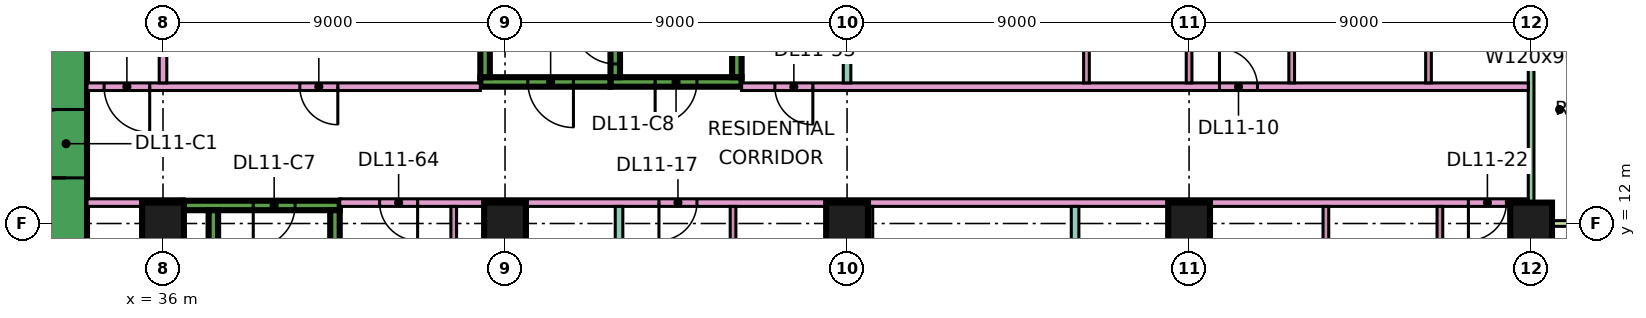
"""IFC4 building model, lengths in metres.
Left out: names, types, materials, properties, quantities, classifications, styles, units other than length and angle.
Written with IfcOpenShell. Run it as: python <this file> out.ifc"""

import sys

from ifc_helpers import new_model, si_unit, direction, frame, frame_2d, origin, origin_2d, place, context, subcontext, project, spatial, rectangle, extrude, element, fill, save


model = new_model("IFC4")
c1 = context("Model", 3, precision=1e-05, world=origin(), true_north=direction((0.0, 1.0)))
c2 = subcontext(c1, "Body", "Model", "MODEL_VIEW")
j1 = project(units=[si_unit("LENGTHUNIT", "METRE"), si_unit("PLANEANGLEUNIT", "RADIAN")], contexts=[c1])
p1 = place(None, origin())
s1 = spatial("IfcSite", under=j1, at=p1, CompositionType="ELEMENT")
p2 = place(p1, origin())
s2 = spatial("IfcBuilding", under=s1, at=p2, CompositionType="ELEMENT")
p3 = place(p2, frame((0.0, 0.0, 56.4)))
s3 = spatial("IfcBuildingStorey", under=s2, at=p3, CompositionType="ELEMENT", Elevation=56.4)
for number, where, z_axis, x_axis in (
    (1, (36.0, 12.0, 0.0), (0.0, 0.0, 1.0), (1.0, 0.0, 0.0)),
    (2, (45.0, 12.0, 0.0), (0.0, 0.0, 1.0), (1.0, 0.0, 0.0)),
    (3, (54.0, 12.0, 0.0), (0.0, 0.0, 1.0), (1.0, 0.0, 0.0)),
    (4, (63.0, 12.0, 0.0), (0.0, 0.0, 1.0), (1.0, 0.0, 0.0)),
    (5, (72.0, 12.0, 0.0), (0.0, 0.0, 1.0), (1.0, 0.0, 0.0)),
):
    element("IfcColumn", number, at=place(p3, frame(where, z_axis=z_axis, x_axis=x_axis)), inside=s3, PredefinedType="COLUMN", context=c2, shape_type="SweptSolid", body=[
        extrude(rectangle(XDim=1.1, YDim=1.1, at=origin_2d()), origin(), (0.0, 0.0, 1.0), 3.75),
    ])
p4 = place(p3, frame((33.45, 8.1, 0.0), z_axis=(0.0, 0.0, 1.0), x_axis=(0.0, 1.0, 0.0)))
e6 = element("IfcWall", 6, at=p4, inside=s3, PredefinedType="SHEAR", context=c2, shape_type="SweptSolid", body=[
    extrude(rectangle(XDim=10.8, YDim=1.1, at=frame_2d((5.4, 0.0))), origin(), (0.0, 0.0, 1.0), 3.75),
])
p5 = place(p4, frame((5.1, 0.0, 0.0)))
e7 = element("IfcOpeningElement", 7, at=p5, cuts=e6, PredefinedType="OPENING", context=c2, shape_type="SweptSolid", body=[
    extrude(rectangle(XDim=1.8, YDim=2.4, at=frame_2d((0.9, 1.2))), frame((0.0, 0.56, 0.0), z_axis=(0.0, -1.0, 0.0), x_axis=(1.0, 0.0, 0.0)), (0.0, 0.0, 1.0), 1.12),
])
p6 = place(p3, frame((36.55, 12.475, 0.0), z_axis=(0.0, 0.0, 1.0), x_axis=(1.0, 0.0, 0.0)))
e8 = element("IfcWall", 8, at=p6, inside=s3, PredefinedType="SHEAR", context=c2, shape_type="SweptSolid", body=[
    extrude(rectangle(XDim=4.1, YDim=0.25, at=frame_2d((2.05, 0.0))), origin(), (0.0, 0.0, 1.0), 3.75),
])
p7 = place(p6, frame((1.825, 0.0, 0.0)))
e9 = element("IfcOpeningElement", 9, at=p7, cuts=e8, PredefinedType="OPENING", context=c2, shape_type="SweptSolid", body=[
    extrude(rectangle(XDim=1.1, YDim=2.2, at=frame_2d((0.55, 1.1))), frame((0.0, 0.135, 0.0), z_axis=(0.0, -1.0, 0.0), x_axis=(1.0, 0.0, 0.0)), (0.0, 0.0, 1.0), 0.27),
])
for number, where, z_axis, x_axis in (
    (10, (37.325, 5.85, 0.0), (0.0, 0.0, 1.0), (0.0, 1.0, 0.0)),
    (11, (40.525, 5.85, 0.0), (0.0, 0.0, 1.0), (0.0, 1.0, 0.0)),
):
    element("IfcWall", number, at=place(p3, frame(where, z_axis=z_axis, x_axis=x_axis)), inside=s3, PredefinedType="SHEAR", context=c2, shape_type="SweptSolid", body=[
        extrude(rectangle(XDim=6.5, YDim=0.25, at=frame_2d((3.25, 0.0))), origin(), (0.0, 0.0, 1.0), 3.75),
    ])
p8 = place(p3, frame((47.775, 15.725, 0.0), z_axis=(0.0, 0.0, 1.0), x_axis=(1.0, 0.0, 0.0)))
e12 = element("IfcWall", 12, at=p8, inside=s3, PredefinedType="SHEAR", context=c2, shape_type="SweptSolid", body=[
    extrude(rectangle(XDim=3.45, YDim=0.25, at=frame_2d((1.725, 0.0))), origin(), (0.0, 0.0, 1.0), 3.75),
])
p9 = place(p8, frame((1.175, 0.0, 0.0)))
e13 = element("IfcOpeningElement", 13, at=p9, cuts=e12, PredefinedType="OPENING", context=c2, shape_type="SweptSolid", body=[
    extrude(rectangle(XDim=1.1, YDim=2.2, at=frame_2d((0.55, 1.1))), frame((0.0, 0.135, 0.0), z_axis=(0.0, -1.0, 0.0), x_axis=(1.0, 0.0, 0.0)), (0.0, 0.0, 1.0), 0.27),
])
p10 = place(p3, frame((47.9, 15.85, 0.0), z_axis=(0.0, 0.0, 1.0), x_axis=(0.0, 1.0, 0.0)))
e14 = element("IfcWall", 14, at=p10, inside=s3, PredefinedType="SHEAR", context=c2, shape_type="SweptSolid", body=[
    extrude(rectangle(XDim=6.5, YDim=0.25, at=frame_2d((3.25, 0.0))), origin(), (0.0, 0.0, 1.0), 3.75),
])
p11 = place(p10, frame((0.35, 0.0, 0.0)))
e15 = element("IfcOpeningElement", 15, at=p11, cuts=e14, PredefinedType="OPENING", context=c2, shape_type="SweptSolid", body=[
    extrude(rectangle(XDim=1.1, YDim=2.2, at=frame_2d((0.55, 1.1))), frame((0.0, 0.135, 0.0), z_axis=(0.0, -1.0, 0.0), x_axis=(1.0, 0.0, 0.0)), (0.0, 0.0, 1.0), 0.27),
])
p12 = place(p3, frame((51.1, 15.85, 0.0), z_axis=(0.0, 0.0, 1.0), x_axis=(0.0, 1.0, 0.0)))
e16 = element("IfcWall", 16, at=p12, inside=s3, PredefinedType="SHEAR", context=c2, shape_type="SweptSolid", body=[
    extrude(rectangle(XDim=6.5, YDim=0.25, at=frame_2d((3.25, 0.0))), origin(), (0.0, 0.0, 1.0), 3.75),
])
p13 = place(p3, frame((44.35, 15.725, 0.0), z_axis=(0.0, 0.0, 1.0), x_axis=(1.0, 0.0, 0.0)))
e17 = element("IfcWall", 17, at=p13, inside=s3, PredefinedType="SHEAR", context=c2, shape_type="SweptSolid", body=[
    extrude(rectangle(XDim=3.425, YDim=0.25, at=frame_2d((1.712, 0.0))), origin(), (0.0, 0.0, 1.0), 3.75),
])
p14 = place(p13, frame((1.25, 0.0, 0.0)))
e18 = element("IfcOpeningElement", 18, at=p14, cuts=e17, PredefinedType="OPENING", context=c2, shape_type="SweptSolid", body=[
    extrude(rectangle(XDim=1.2, YDim=2.2, at=frame_2d((0.6, 1.1))), frame((0.0, 0.135, 0.0), z_axis=(0.0, -1.0, 0.0), x_axis=(1.0, 0.0, 0.0)), (0.0, 0.0, 1.0), 0.27),
])
p15 = place(p3, frame((44.475, 15.85, 0.0), z_axis=(0.0, 0.0, 1.0), x_axis=(0.0, 1.0, 0.0)))
e19 = element("IfcWall", 19, at=p15, inside=s3, PredefinedType="SHEAR", context=c2, shape_type="SweptSolid", body=[
    extrude(rectangle(XDim=6.5, YDim=0.25, at=frame_2d((3.25, 0.0))), origin(), (0.0, 0.0, 1.0), 3.75),
])
p16 = place(p15, frame((1.75, 0.0, 0.0)))
e20 = element("IfcOpeningElement", 20, at=p16, cuts=e19, PredefinedType="OPENING", context=c2, shape_type="SweptSolid", body=[
    extrude(rectangle(XDim=1.1, YDim=2.2, at=frame_2d((0.55, 1.1))), frame((0.0, 0.135, 0.0), z_axis=(0.0, -1.0, 0.0), x_axis=(1.0, 0.0, 0.0)), (0.0, 0.0, 1.0), 0.27),
])
p17 = place(p15, frame((4.3, 0.0, 0.0)))
e21 = element("IfcOpeningElement", 21, at=p17, cuts=e19, PredefinedType="OPENING", context=c2, shape_type="SweptSolid", body=[
    extrude(rectangle(XDim=1.1, YDim=2.2, at=frame_2d((0.55, 1.1))), frame((0.0, 0.135, 0.0), z_axis=(0.0, -1.0, 0.0), x_axis=(1.0, 0.0, 0.0)), (0.0, 0.0, 1.0), 0.27),
])
p18 = place(p3, frame((72.0, 12.075, 0.0), z_axis=(0.0, 0.0, 1.0), x_axis=(0.0, 1.0, 0.0)))
e22 = element("IfcWall", 22, at=p18, inside=s3, PredefinedType="SOLIDWALL", context=c2, shape_type="SweptSolid", body=[
    extrude(rectangle(XDim=10.35, YDim=0.15, at=frame_2d((5.175, 0.0))), origin(), (0.0, 0.0, 1.0), 3.35),
])
p19 = place(p18, frame((4.275, 0.0, 1.7)))
e23 = element("IfcOpeningElement", 23, at=p19, cuts=e22, PredefinedType="OPENING", context=c2, shape_type="SweptSolid", body=[
    extrude(rectangle(XDim=1.2, YDim=0.9, at=frame_2d((0.6, 0.45))), frame((0.0, 0.085, 0.0), z_axis=(0.0, -1.0, 0.0), x_axis=(1.0, 0.0, 0.0)), (0.0, 0.0, 1.0), 0.17),
])
p20 = place(p18, frame((7.988, 0.0, 0.45)))
e24 = element("IfcOpeningElement", 24, at=p20, cuts=e22, PredefinedType="OPENING", context=c2, shape_type="SweptSolid", body=[
    extrude(rectangle(XDim=1.8, YDim=2.4, at=frame_2d((0.9, 1.2))), frame((0.0, 0.085, 0.0), z_axis=(0.0, -1.0, 0.0), x_axis=(1.0, 0.0, 0.0)), (0.0, 0.0, 1.0), 0.17),
])
p21 = place(p3, frame((73.5, 12.0, 0.0), z_axis=(0.0, 0.0, 1.0), x_axis=(-1.0, 0.0, 0.0)))
e25 = element("IfcWall", 25, at=p21, inside=s3, PredefinedType="SOLIDWALL", context=c2, shape_type="SweptSolid", body=[
    extrude(rectangle(XDim=1.5, YDim=0.15, at=frame_2d((0.75, 0.0))), origin(), (0.0, 0.0, 1.0), 3.35),
])
p22 = place(p3, frame((34.0, 12.55, 0.0), z_axis=(0.0, 0.0, 1.0), x_axis=(1.0, 0.0, 0.0)))
e26 = element("IfcWall", 26, at=p22, inside=s3, PredefinedType="PARTITIONING", context=c2, shape_type="SweptSolid", body=[
    extrude(rectangle(XDim=2.551, YDim=0.2, at=frame_2d((1.275, 0.0))), origin(), (0.0, 0.0, 1.0), 3.35),
])
p23 = place(p3, frame((34.0, 15.6, 0.0), z_axis=(0.0, 0.0, 1.0), x_axis=(1.0, 0.0, 0.0)))
e27 = element("IfcWall", 27, at=p23, inside=s3, PredefinedType="PARTITIONING", context=c2, shape_type="SweptSolid", body=[
    extrude(rectangle(XDim=10.35, YDim=0.2, at=frame_2d((5.175, 0.0))), origin(), (0.0, 0.0, 1.0), 3.35),
])
p24 = place(p23, frame((5.6, 0.0, 0.0)))
e28 = element("IfcOpeningElement", 28, at=p24, cuts=e27, PredefinedType="OPENING", context=c2, shape_type="SweptSolid", body=[
    extrude(rectangle(XDim=1.0, YDim=2.1, at=frame_2d((0.5, 1.05))), frame((0.0, 0.11, 0.0), z_axis=(0.0, -1.0, 0.0), x_axis=(1.0, 0.0, 0.0)), (0.0, 0.0, 1.0), 0.22),
])
p25 = place(p23, frame((0.45, 0.0, 0.0)))
e29 = element("IfcOpeningElement", 29, at=p25, cuts=e27, PredefinedType="OPENING", context=c2, shape_type="SweptSolid", body=[
    extrude(rectangle(XDim=1.2, YDim=2.1, at=frame_2d((0.6, 1.05))), frame((0.0, 0.11, 0.0), z_axis=(0.0, -1.0, 0.0), x_axis=(1.0, 0.0, 0.0)), (0.0, 0.0, 1.0), 0.22),
])
p26 = place(p3, frame((36.0, 15.7, 0.0), z_axis=(0.0, 0.0, 1.0), x_axis=(0.0, 1.0, 0.0)))
e30 = element("IfcWall", 30, at=p26, inside=s3, PredefinedType="PARTITIONING", context=c2, shape_type="SweptSolid", body=[
    extrude(rectangle(XDim=8.3, YDim=0.2, at=frame_2d((4.15, 0.0))), origin(), (0.0, 0.0, 1.0), 3.35),
])
p27 = place(p3, frame((40.65, 12.55, 0.0), z_axis=(0.0, 0.0, 1.0), x_axis=(1.0, 0.0, 0.0)))
e31 = element("IfcWall", 31, at=p27, inside=s3, PredefinedType="PARTITIONING", context=c2, shape_type="SweptSolid", body=[
    extrude(rectangle(XDim=31.276, YDim=0.2, at=frame_2d((15.638, 0.0))), origin(), (0.0, 0.0, 1.0), 3.35),
])
p28 = place(p27, frame((8.4, 0.0, 0.0)))
e32 = element("IfcOpeningElement", 32, at=p28, cuts=e31, PredefinedType="OPENING", context=c2, shape_type="SweptSolid", body=[
    extrude(rectangle(XDim=1.0, YDim=2.1, at=frame_2d((0.5, 1.05))), frame((0.0, 0.11, 0.0), z_axis=(0.0, -1.0, 0.0), x_axis=(1.0, 0.0, 0.0)), (0.0, 0.0, 1.0), 0.22),
])
p29 = place(p27, frame((29.7, 0.0, 0.0)))
e33 = element("IfcOpeningElement", 33, at=p29, cuts=e31, PredefinedType="OPENING", context=c2, shape_type="SweptSolid", body=[
    extrude(rectangle(XDim=1.0, YDim=2.1, at=frame_2d((0.5, 1.05))), frame((0.0, 0.11, 0.0), z_axis=(0.0, -1.0, 0.0), x_axis=(1.0, 0.0, 0.0)), (0.0, 0.0, 1.0), 0.22),
])
p30 = place(p27, frame((1.05, 0.0, 0.0)))
e34 = element("IfcOpeningElement", 34, at=p30, cuts=e31, PredefinedType="OPENING", context=c2, shape_type="SweptSolid", body=[
    extrude(rectangle(XDim=1.0, YDim=2.1, at=frame_2d((0.5, 1.05))), frame((0.0, 0.11, 0.0), z_axis=(0.0, -1.0, 0.0), x_axis=(1.0, 0.0, 0.0)), (0.0, 0.0, 1.0), 0.22),
])
p31 = place(p3, frame((43.65, 5.825, 0.0), z_axis=(0.0, 0.0, 1.0), x_axis=(0.0, 1.0, 0.0)))
e35 = element("IfcWall", 35, at=p31, inside=s3, PredefinedType="PARTITIONING", context=c2, shape_type="SweptSolid", body=[
    extrude(rectangle(XDim=6.625, YDim=0.15, at=frame_2d((3.312, 0.0))), origin(), (0.0, 0.0, 1.0), 3.35),
])
p32 = place(p31, frame((4.425, 0.0, 0.0)))
e36 = element("IfcOpeningElement", 36, at=p32, cuts=e35, PredefinedType="OPENING", context=c2, shape_type="SweptSolid", body=[
    extrude(rectangle(XDim=0.9, YDim=2.1, at=frame_2d((0.45, 1.05))), frame((0.0, 0.085, 0.0), z_axis=(0.0, -1.0, 0.0), x_axis=(1.0, 0.0, 0.0)), (0.0, 0.0, 1.0), 0.17),
])
p33 = place(p3, frame((48.0, 5.9, 0.0), z_axis=(0.0, 0.0, 1.0), x_axis=(0.0, 1.0, 0.0)))
e37 = element("IfcWall", 37, at=p33, inside=s3, PredefinedType="PARTITIONING", context=c2, shape_type="SweptSolid", body=[
    extrude(rectangle(XDim=6.55, YDim=0.2, at=frame_2d((3.275, 0.0))), origin(), (0.0, 0.0, 1.0), 3.35),
])
p34 = place(p3, frame((51.0, 7.225, 0.0), z_axis=(0.0, 0.0, 1.0), x_axis=(0.0, 1.0, 0.0)))
e38 = element("IfcWall", 38, at=p34, inside=s3, PredefinedType="PARTITIONING", context=c2, shape_type="SweptSolid", body=[
    extrude(rectangle(XDim=5.225, YDim=0.15, at=frame_2d((2.612, 0.0))), origin(), (0.0, 0.0, 1.0), 3.35),
])
p35 = place(p34, frame((2.175, 0.0, 0.0)))
e39 = element("IfcOpeningElement", 39, at=p35, cuts=e38, PredefinedType="OPENING", context=c2, shape_type="SweptSolid", body=[
    extrude(rectangle(XDim=0.8, YDim=2.1, at=frame_2d((0.4, 1.05))), frame((0.0, 0.085, 0.0), z_axis=(0.0, -1.0, 0.0), x_axis=(1.0, 0.0, 0.0)), (0.0, 0.0, 1.0), 0.17),
])
p36 = place(p3, frame((51.225, 15.6, 0.0), z_axis=(0.0, 0.0, 1.0), x_axis=(1.0, 0.0, 0.0)))
e40 = element("IfcWall", 40, at=p36, inside=s3, PredefinedType="PARTITIONING", context=c2, shape_type="SweptSolid", body=[
    extrude(rectangle(XDim=20.701, YDim=0.2, at=frame_2d((10.351, 0.0))), origin(), (0.0, 0.0, 1.0), 3.35),
])
p37 = place(p36, frame((12.575, 0.0, 0.0)))
e41 = element("IfcOpeningElement", 41, at=p37, cuts=e40, PredefinedType="OPENING", context=c2, shape_type="SweptSolid", body=[
    extrude(rectangle(XDim=1.0, YDim=2.1, at=frame_2d((0.5, 1.05))), frame((0.0, 0.11, 0.0), z_axis=(0.0, -1.0, 0.0), x_axis=(1.0, 0.0, 0.0)), (0.0, 0.0, 1.0), 0.22),
])
p38 = place(p36, frame((0.875, 0.0, 0.0)))
e42 = element("IfcOpeningElement", 42, at=p38, cuts=e40, PredefinedType="OPENING", context=c2, shape_type="SweptSolid", body=[
    extrude(rectangle(XDim=1.0, YDim=2.1, at=frame_2d((0.5, 1.05))), frame((0.0, 0.11, 0.0), z_axis=(0.0, -1.0, 0.0), x_axis=(1.0, 0.0, 0.0)), (0.0, 0.0, 1.0), 0.22),
])
p39 = place(p3, frame((54.0, 15.7, 0.0), z_axis=(0.0, 0.0, 1.0), x_axis=(0.0, 1.0, 0.0)))
e43 = element("IfcWall", 43, at=p39, inside=s3, PredefinedType="PARTITIONING", context=c2, shape_type="SweptSolid", body=[
    extrude(rectangle(XDim=8.3, YDim=0.2, at=frame_2d((4.15, 0.0))), origin(), (0.0, 0.0, 1.0), 3.35),
])
p40 = place(p3, frame((54.6, 7.225, 0.0), z_axis=(0.0, 0.0, 1.0), x_axis=(0.0, 1.0, 0.0)))
e44 = element("IfcWall", 44, at=p40, inside=s3, PredefinedType="PARTITIONING", context=c2, shape_type="SweptSolid", body=[
    extrude(rectangle(XDim=5.225, YDim=0.15, at=frame_2d((2.612, 0.0))), origin(), (0.0, 0.0, 1.0), 3.35),
])
p41 = place(p3, frame((60.0, 0.0, 0.0), z_axis=(0.0, 0.0, 1.0), x_axis=(0.0, 1.0, 0.0)))
e45 = element("IfcWall", 45, at=p41, inside=s3, PredefinedType="PARTITIONING", context=c2, shape_type="SweptSolid", body=[
    extrude(rectangle(XDim=12.45, YDim=0.2, at=frame_2d((6.225, 0.0))), origin(), (0.0, 0.0, 1.0), 3.35),
])
p42 = place(p3, frame((60.3, 15.7, 0.0), z_axis=(0.0, 0.0, 1.0), x_axis=(0.0, 1.0, 0.0)))
e46 = element("IfcWall", 46, at=p42, inside=s3, PredefinedType="PARTITIONING", context=c2, shape_type="SweptSolid", body=[
    extrude(rectangle(XDim=2.525, YDim=0.15, at=frame_2d((1.263, 0.0))), origin(), (0.0, 0.0, 1.0), 3.35),
])
p43 = place(p3, frame((63.0, 15.7, 0.0), z_axis=(0.0, 0.0, 1.0), x_axis=(0.0, 1.0, 0.0)))
e47 = element("IfcWall", 47, at=p43, inside=s3, PredefinedType="PARTITIONING", context=c2, shape_type="SweptSolid", body=[
    extrude(rectangle(XDim=2.525, YDim=0.15, at=frame_2d((1.263, 0.0))), origin(), (0.0, 0.0, 1.0), 3.35),
])
p44 = place(p43, frame((0.9, 0.0, 0.0)))
e48 = element("IfcOpeningElement", 48, at=p44, cuts=e47, PredefinedType="OPENING", context=c2, shape_type="SweptSolid", body=[
    extrude(rectangle(XDim=0.8, YDim=2.1, at=frame_2d((0.4, 1.05))), frame((0.0, 0.085, 0.0), z_axis=(0.0, -1.0, 0.0), x_axis=(1.0, 0.0, 0.0)), (0.0, 0.0, 1.0), 0.17),
])
p45 = place(p3, frame((65.7, 15.7, 0.0), z_axis=(0.0, 0.0, 1.0), x_axis=(0.0, 1.0, 0.0)))
e49 = element("IfcWall", 49, at=p45, inside=s3, PredefinedType="PARTITIONING", context=c2, shape_type="SweptSolid", body=[
    extrude(rectangle(XDim=2.525, YDim=0.15, at=frame_2d((1.263, 0.0))), origin(), (0.0, 0.0, 1.0), 3.35),
])
p46 = place(p3, frame((66.6, 7.825, 0.0), z_axis=(0.0, 0.0, 1.0), x_axis=(0.0, 1.0, 0.0)))
e50 = element("IfcWall", 50, at=p46, inside=s3, PredefinedType="PARTITIONING", context=c2, shape_type="SweptSolid", body=[
    extrude(rectangle(XDim=4.625, YDim=0.15, at=frame_2d((2.312, 0.0))), origin(), (0.0, 0.0, 1.0), 3.35),
])
p47 = place(p3, frame((69.3, 15.7, 0.0), z_axis=(0.0, 0.0, 1.0), x_axis=(0.0, 1.0, 0.0)))
e51 = element("IfcWall", 51, at=p47, inside=s3, PredefinedType="PARTITIONING", context=c2, shape_type="SweptSolid", body=[
    extrude(rectangle(XDim=2.525, YDim=0.15, at=frame_2d((1.263, 0.0))), origin(), (0.0, 0.0, 1.0), 3.35),
])
p48 = place(p3, frame((69.6, 7.825, 0.0), z_axis=(0.0, 0.0, 1.0), x_axis=(0.0, 1.0, 0.0)))
e52 = element("IfcWall", 52, at=p48, inside=s3, PredefinedType="PARTITIONING", context=c2, shape_type="SweptSolid", body=[
    extrude(rectangle(XDim=4.625, YDim=0.15, at=frame_2d((2.312, 0.0))), origin(), (0.0, 0.0, 1.0), 3.35),
])
p49 = place(p19, origin())
e53 = element("IfcWindow", 53, at=p49, inside=s3, PartitioningType="SINGLE_PANEL", PredefinedType="WINDOW", context=c2, shape_type="SweptSolid", body=[
    extrude(rectangle(XDim=1.2, YDim=0.9, at=frame_2d((0.6, 0.45))), frame((0.0, 0.03, 0.0), z_axis=(0.0, -1.0, 0.0), x_axis=(1.0, 0.0, 0.0)), (0.0, 0.0, 1.0), 0.06),
])
fill(e23, e53)
p50 = place(p5, origin())
e54 = element("IfcDoor", 54, at=p50, inside=s3, OperationType="DOUBLE_DOOR_SINGLE_SWING", PredefinedType="DOOR", context=c2, shape_type="SweptSolid", body=[
    extrude(rectangle(XDim=1.8, YDim=2.4, at=frame_2d((0.9, 1.2))), frame((0.0, 0.025, 0.0), z_axis=(0.0, -1.0, 0.0), x_axis=(1.0, 0.0, 0.0)), (0.0, 0.0, 1.0), 0.05),
])
fill(e7, e54)
p51 = place(p7, frame((1.1, 0.0, 0.0), z_axis=(0.0, 0.0, 1.0), x_axis=(-1.0, 0.0, 0.0)))
e55 = element("IfcDoor", 55, at=p51, inside=s3, OperationType="SINGLE_SWING_LEFT", PredefinedType="DOOR", context=c2, shape_type="SweptSolid", body=[
    extrude(rectangle(XDim=1.1, YDim=2.2, at=frame_2d((0.55, 1.1))), frame((0.0, 0.025, 0.0), z_axis=(0.0, -1.0, 0.0), x_axis=(1.0, 0.0, 0.0)), (0.0, 0.0, 1.0), 0.05),
])
fill(e9, e55)
p52 = place(p9, frame((1.1, 0.0, 0.0), z_axis=(0.0, 0.0, 1.0), x_axis=(-1.0, 0.0, 0.0)))
e56 = element("IfcDoor", 56, at=p52, inside=s3, OperationType="SINGLE_SWING_LEFT", PredefinedType="DOOR", context=c2, shape_type="SweptSolid", body=[
    extrude(rectangle(XDim=1.1, YDim=2.2, at=frame_2d((0.55, 1.1))), frame((0.0, 0.025, 0.0), z_axis=(0.0, -1.0, 0.0), x_axis=(1.0, 0.0, 0.0)), (0.0, 0.0, 1.0), 0.05),
])
fill(e13, e56)
p53 = place(p14, origin())
e57 = element("IfcDoor", 57, at=p53, inside=s3, OperationType="SINGLE_SWING_RIGHT", PredefinedType="DOOR", context=c2, shape_type="SweptSolid", body=[
    extrude(rectangle(XDim=1.2, YDim=2.2, at=frame_2d((0.6, 1.1))), frame((0.0, 0.025, 0.0), z_axis=(0.0, -1.0, 0.0), x_axis=(1.0, 0.0, 0.0)), (0.0, 0.0, 1.0), 0.05),
])
fill(e18, e57)
p54 = place(p11, frame((1.1, 0.0, 0.0), z_axis=(0.0, 0.0, 1.0), x_axis=(-1.0, 0.0, 0.0)))
e58 = element("IfcDoor", 58, at=p54, inside=s3, OperationType="SINGLE_SWING_RIGHT", PredefinedType="DOOR", context=c2, shape_type="SweptSolid", body=[
    extrude(rectangle(XDim=1.1, YDim=2.2, at=frame_2d((0.55, 1.1))), frame((0.0, 0.025, 0.0), z_axis=(0.0, -1.0, 0.0), x_axis=(1.0, 0.0, 0.0)), (0.0, 0.0, 1.0), 0.05),
])
fill(e15, e58)
p55 = place(p24, origin())
e59 = element("IfcDoor", 59, at=p55, inside=s3, OperationType="SINGLE_SWING_RIGHT", PredefinedType="DOOR", context=c2, shape_type="SweptSolid", body=[
    extrude(rectangle(XDim=1.0, YDim=2.1, at=frame_2d((0.5, 1.05))), frame((0.0, 0.025, 0.0), z_axis=(0.0, -1.0, 0.0), x_axis=(1.0, 0.0, 0.0)), (0.0, 0.0, 1.0), 0.05),
])
fill(e28, e59)
p56 = place(p37, origin())
e60 = element("IfcDoor", 60, at=p56, inside=s3, OperationType="SINGLE_SWING_LEFT", PredefinedType="DOOR", context=c2, shape_type="SweptSolid", body=[
    extrude(rectangle(XDim=1.0, YDim=2.1, at=frame_2d((0.5, 1.05))), frame((0.0, 0.025, 0.0), z_axis=(0.0, -1.0, 0.0), x_axis=(1.0, 0.0, 0.0)), (0.0, 0.0, 1.0), 0.05),
])
fill(e41, e60)
p57 = place(p28, frame((1.0, 0.0, 0.0), z_axis=(0.0, 0.0, 1.0), x_axis=(-1.0, 0.0, 0.0)))
e61 = element("IfcDoor", 61, at=p57, inside=s3, OperationType="SINGLE_SWING_LEFT", PredefinedType="DOOR", context=c2, shape_type="SweptSolid", body=[
    extrude(rectangle(XDim=1.0, YDim=2.1, at=frame_2d((0.5, 1.05))), frame((0.0, 0.025, 0.0), z_axis=(0.0, -1.0, 0.0), x_axis=(1.0, 0.0, 0.0)), (0.0, 0.0, 1.0), 0.05),
])
fill(e32, e61)
p58 = place(p29, frame((1.0, 0.0, 0.0), z_axis=(0.0, 0.0, 1.0), x_axis=(-1.0, 0.0, 0.0)))
e62 = element("IfcDoor", 62, at=p58, inside=s3, OperationType="SINGLE_SWING_LEFT", PredefinedType="DOOR", context=c2, shape_type="SweptSolid", body=[
    extrude(rectangle(XDim=1.0, YDim=2.1, at=frame_2d((0.5, 1.05))), frame((0.0, 0.025, 0.0), z_axis=(0.0, -1.0, 0.0), x_axis=(1.0, 0.0, 0.0)), (0.0, 0.0, 1.0), 0.05),
])
fill(e33, e62)
p59 = place(p25, origin())
e63 = element("IfcDoor", 63, at=p59, inside=s3, OperationType="SINGLE_SWING_RIGHT", PredefinedType="DOOR", context=c2, shape_type="SweptSolid", body=[
    extrude(rectangle(XDim=1.2, YDim=2.1, at=frame_2d((0.6, 1.05))), frame((0.0, 0.025, 0.0), z_axis=(0.0, -1.0, 0.0), x_axis=(1.0, 0.0, 0.0)), (0.0, 0.0, 1.0), 0.05),
])
fill(e29, e63)
p60 = place(p38, origin())
e64 = element("IfcDoor", 64, at=p60, inside=s3, OperationType="SINGLE_SWING_RIGHT", PredefinedType="DOOR", context=c2, shape_type="SweptSolid", body=[
    extrude(rectangle(XDim=1.0, YDim=2.1, at=frame_2d((0.5, 1.05))), frame((0.0, 0.025, 0.0), z_axis=(0.0, -1.0, 0.0), x_axis=(1.0, 0.0, 0.0)), (0.0, 0.0, 1.0), 0.05),
])
fill(e42, e64)
p61 = place(p30, origin())
e65 = element("IfcDoor", 65, at=p61, inside=s3, OperationType="SINGLE_SWING_RIGHT", PredefinedType="DOOR", context=c2, shape_type="SweptSolid", body=[
    extrude(rectangle(XDim=1.0, YDim=2.1, at=frame_2d((0.5, 1.05))), frame((0.0, 0.025, 0.0), z_axis=(0.0, -1.0, 0.0), x_axis=(1.0, 0.0, 0.0)), (0.0, 0.0, 1.0), 0.05),
])
fill(e34, e65)
save(model, sys.argv[1])
